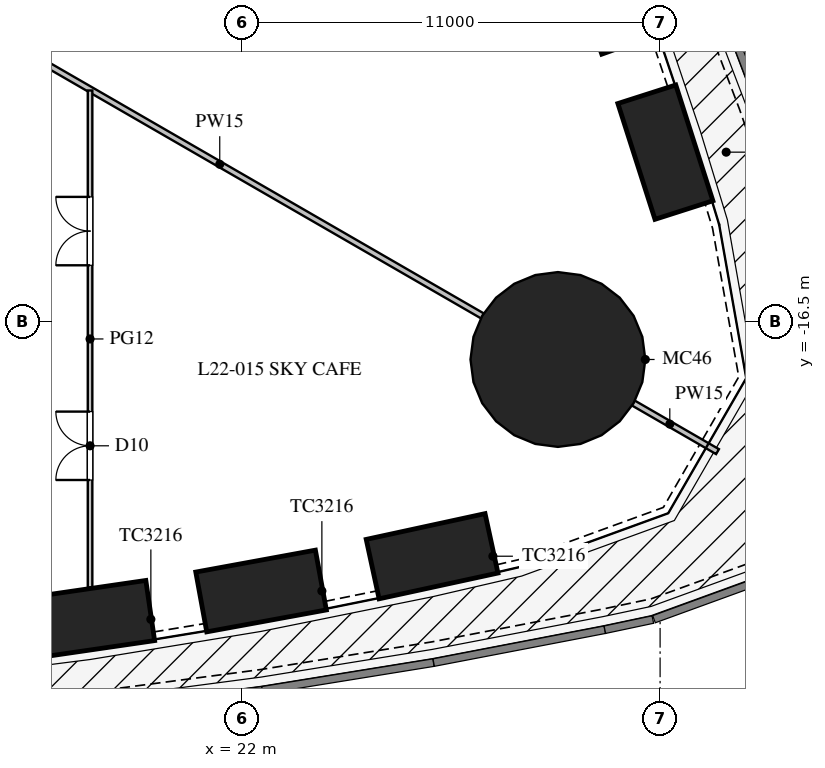
"""IFC4 building model, lengths in metres.
Left out: names, types, materials, properties, quantities, classifications, styles, units other than length and angle.
Written with IfcOpenShell. Run it as: python <this file> out.ifc"""

import sys

from ifc_helpers import new_model, si_unit, direction, frame, frame_2d, origin, origin_2d, place, context, subcontext, project, spatial, rectangle, circle, extrude, element, fill, save


model = new_model("IFC4")
c1 = context("Model", 3, precision=1e-05, world=origin(), true_north=direction((0.0, 1.0)))
c2 = subcontext(c1, "Body", "Model", "MODEL_VIEW")
j1 = project(units=[si_unit("LENGTHUNIT", "METRE"), si_unit("PLANEANGLEUNIT", "RADIAN")], contexts=[c1])
p1 = place(None, origin())
s1 = spatial("IfcSite", under=j1, at=p1, CompositionType="ELEMENT")
p2 = place(p1, origin())
s2 = spatial("IfcBuilding", under=s1, at=p2, CompositionType="ELEMENT")
p3 = place(p2, frame((0.0, 0.0, 98.1)))
s3 = spatial("IfcBuildingStorey", under=s2, at=p3, CompositionType="ELEMENT", Elevation=98.1)
for number, where, z_axis, x_axis in (
    (1, (18.0, -24.337, 0.0), (0.0, 0.0, 1.0), (0.99, 0.144, 0.0)),
    (2, (22.5, -23.593, 0.0), (0.0, 0.0, 1.0), (0.984, 0.18, 0.0)),
    (3, (27.0, -22.677, 0.0), (0.0, 0.0, 1.0), (0.977, 0.212, 0.0)),
    (4, (33.139, -12.044, 0.0), (0.0, 0.0, 1.0), (-0.305, 0.952, 0.0)),
    (5, (31.682, -7.689, 0.0), (0.0, 0.0, 1.0), (-0.336, 0.942, 0.0)),
):
    element("IfcColumn", number, at=place(p3, frame(where, z_axis=z_axis, x_axis=x_axis)), inside=s3, PredefinedType="COLUMN", context=c2, shape_type="SweptSolid", body=[
        extrude(rectangle(XDim=3.2, YDim=1.6, at=origin_2d()), origin(), (0.0, 0.0, 1.0), 5.0),
    ])
p4 = place(p3, frame((30.311, -17.5, 0.0), z_axis=(0.0, 0.0, 1.0), x_axis=(1.0, 0.0, 0.0)))
e6 = element("IfcColumn", 6, at=p4, inside=s3, PredefinedType="COLUMN", context=c2, shape_type="SweptSolid", body=[
    extrude(circle(Radius=2.3, at=origin_2d()), origin(), (0.0, 0.0, 1.0), 5.0),
])
p5 = place(p3, frame((10.97, -13.0, 0.0), z_axis=(0.0, 0.0, 1.0), x_axis=(0.499995765644, 0.866027848477, 0.0)))
e7 = element("IfcWall", 7, at=p5, inside=s3, PredefinedType="SHEAR", context=c2, shape_type="SweptSolid", body=[
    extrude(rectangle(XDim=11.547, YDim=0.8, at=frame_2d((5.773, 0.0))), origin(), (0.0, 0.0, 1.0), 5.0),
])
p6 = place(p3, frame((18.0, -26.576, 0.0), z_axis=(0.0, 0.0, 1.0), x_axis=(0.991435244698, 0.130599217346, 0.0)))
e8 = element("IfcWall", 8, at=p6, inside=s3, PredefinedType="PARAPET", context=c2, shape_type="SweptSolid", body=[
    extrude(rectangle(XDim=4.539, YDim=0.25, at=frame_2d((2.27, 0.0))), origin(), (0.0, 0.0, 1.0), 1.1),
])
p7 = place(p3, frame((22.5, -25.983, 0.0), z_axis=(0.0, 0.0, 1.0), x_axis=(0.987181300889, 0.159602879593, 0.0)))
e9 = element("IfcWall", 9, at=p7, inside=s3, PredefinedType="PARAPET", context=c2, shape_type="SweptSolid", body=[
    extrude(rectangle(XDim=4.558, YDim=0.25, at=frame_2d((2.279, 0.0))), origin(), (0.0, 0.0, 1.0), 1.1),
])
p8 = place(p3, frame((27.0, -25.255, 0.0), z_axis=(0.0, 0.0, 1.0), x_axis=(0.982052021543, 0.188610251533, 0.0)))
e10 = element("IfcWall", 10, at=p8, inside=s3, PredefinedType="PARAPET", context=c2, shape_type="SweptSolid", body=[
    extrude(rectangle(XDim=4.582, YDim=0.25, at=frame_2d((2.291, 0.0))), origin(), (0.0, 0.0, 1.0), 1.1),
])
p9 = place(p3, frame((31.5, -24.391, 0.0), z_axis=(0.0, 0.0, 1.0), x_axis=(0.978306217861, 0.207164051162, 0.0)))
e11 = element("IfcWall", 11, at=p9, inside=s3, PredefinedType="PARAPET", context=c2, shape_type="SweptSolid", body=[
    extrude(rectangle(XDim=1.291, YDim=0.25, at=frame_2d((0.645, 0.0))), origin(), (0.0, 0.0, 1.0), 1.1),
])
p10 = place(p3, frame((32.762, -24.124, 0.0), z_axis=(0.0, 0.0, 1.0), x_axis=(0.939695347797, 0.342012650832, 0.0)))
e12 = element("IfcWall", 12, at=p10, inside=s3, PredefinedType="PARAPET", context=c2, shape_type="SweptSolid", body=[
    extrude(rectangle(XDim=3.563, YDim=0.25, at=frame_2d((1.781, 0.0))), origin(), (0.0, 0.0, 1.0), 1.1),
])
p11 = place(p3, frame((35.372, -10.755, 0.0), z_axis=(0.0, 0.0, 1.0), x_axis=(-0.355369393324, 0.934725946087, 0.0)))
e13 = element("IfcWall", 13, at=p11, inside=s3, PredefinedType="PARAPET", context=c2, shape_type="SweptSolid", body=[
    extrude(rectangle(XDim=4.558, YDim=0.25, at=frame_2d((2.279, 0.0))), origin(), (0.0, 0.0, 1.0), 1.1),
])
p12 = place(p3, frame((14.203, -8.2, 0.0), z_axis=(0.0, 0.0, 1.0), x_axis=(0.866024668836, -0.500001272966, 0.0)))
e14 = element("IfcWall", 14, at=p12, inside=s3, PredefinedType="PARTITIONING", context=c2, shape_type="SweptSolid", body=[
    extrude(rectangle(XDim=16.65, YDim=0.15, at=frame_2d((8.325, 0.0))), origin(), (0.0, 0.0, 1.0), 3.1),
])
p13 = place(p3, frame((32.0, -18.475, 0.0), z_axis=(0.0, 0.0, 1.0), x_axis=(0.866042548026, -0.499970304126, 0.0)))
e15 = element("IfcWall", 15, at=p13, inside=s3, PredefinedType="PARTITIONING", context=c2, shape_type="SweptSolid", body=[
    extrude(rectangle(XDim=2.899, YDim=0.15, at=frame_2d((1.45, 0.0))), origin(), (0.0, 0.0, 1.0), 3.1),
])
p14 = place(p3, frame((18.0, -10.421, 0.0), z_axis=(0.0, 0.0, 1.0), x_axis=(0.0, -1.0, 0.0)))
e16 = element("IfcWall", 16, at=p14, inside=s3, PredefinedType="PARTITIONING", context=c2, shape_type="SweptSolid", body=[
    extrude(rectangle(XDim=13.077, YDim=0.12, at=frame_2d((6.539, 0.0))), origin(), (0.0, 0.0, 1.0), 3.2),
])
p15 = place(p14, frame((2.8, 0.0, 0.0)))
e17 = element("IfcOpeningElement", 17, at=p15, cuts=e16, PredefinedType="OPENING", context=c2, shape_type="SweptSolid", body=[
    extrude(rectangle(XDim=1.8, YDim=2.1, at=frame_2d((0.9, 1.05))), frame((0.0, 0.07, 0.0), z_axis=(0.0, -1.0, 0.0), x_axis=(1.0, 0.0, 0.0)), (0.0, 0.0, 1.0), 0.14),
])
p16 = place(p14, frame((8.45, 0.0, 0.0)))
e18 = element("IfcOpeningElement", 18, at=p16, cuts=e16, PredefinedType="OPENING", context=c2, shape_type="SweptSolid", body=[
    extrude(rectangle(XDim=1.8, YDim=2.1, at=frame_2d((0.9, 1.05))), frame((0.0, 0.07, 0.0), z_axis=(0.0, -1.0, 0.0), x_axis=(1.0, 0.0, 0.0)), (0.0, 0.0, 1.0), 0.14),
])
p17 = place(p15, frame((1.8, 0.0, 0.0), z_axis=(0.0, 0.0, 1.0), x_axis=(-1.0, 0.0, 0.0)))
e19 = element("IfcDoor", 19, at=p17, inside=s3, OperationType="DOUBLE_DOOR_SINGLE_SWING", PredefinedType="DOOR", context=c2, shape_type="SweptSolid", body=[
    extrude(rectangle(XDim=1.8, YDim=2.1, at=frame_2d((0.9, 1.05))), frame((0.0, 0.025, 0.0), z_axis=(0.0, -1.0, 0.0), x_axis=(1.0, 0.0, 0.0)), (0.0, 0.0, 1.0), 0.05),
])
fill(e17, e19)
p18 = place(p16, frame((1.8, 0.0, 0.0), z_axis=(0.0, 0.0, 1.0), x_axis=(-1.0, 0.0, 0.0)))
e20 = element("IfcDoor", 20, at=p18, inside=s3, OperationType="DOUBLE_DOOR_SINGLE_SWING", PredefinedType="DOOR", context=c2, shape_type="SweptSolid", body=[
    extrude(rectangle(XDim=1.8, YDim=2.1, at=frame_2d((0.9, 1.05))), frame((0.0, 0.025, 0.0), z_axis=(0.0, -1.0, 0.0), x_axis=(1.0, 0.0, 0.0)), (0.0, 0.0, 1.0), 0.05),
])
fill(e18, e20)
save(model, sys.argv[1])
